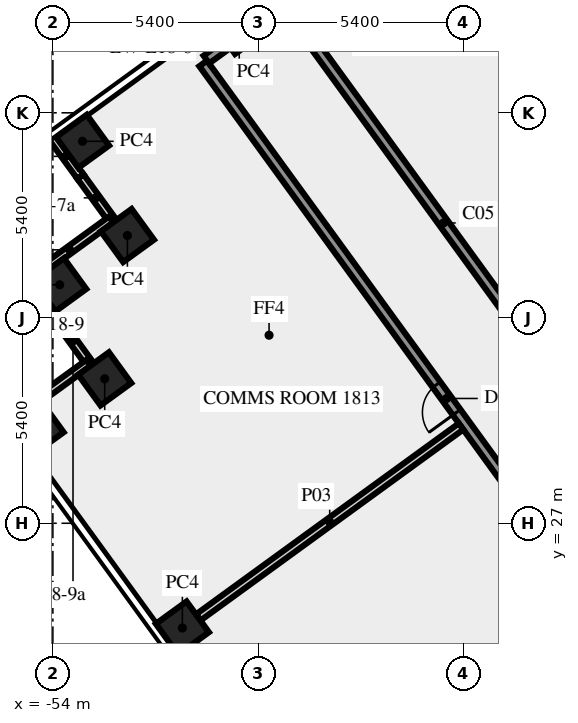
"""IFC4 building model, lengths in metres.
Left out: names, types, materials, properties, quantities, classifications, styles, units other than length and angle.
Written with IfcOpenShell. Run it as: python <this file> out.ifc"""

import sys

from ifc_helpers import new_model, si_unit, direction, frame, frame_2d, origin, origin_2d, place, context, subcontext, project, spatial, rectangle, extrude, element, fill, save


model = new_model("IFC4")
c1 = context("Model", 3, precision=1e-05, world=origin(), true_north=direction((0.0, 1.0)))
c2 = subcontext(c1, "Body", "Model", "MODEL_VIEW")
j1 = project(units=[si_unit("LENGTHUNIT", "METRE"), si_unit("PLANEANGLEUNIT", "RADIAN")], contexts=[c1])
p1 = place(None, origin())
s1 = spatial("IfcSite", under=j1, at=p1, CompositionType="ELEMENT")
p2 = place(p1, origin())
s2 = spatial("IfcBuilding", under=s1, at=p2, CompositionType="ELEMENT")
p3 = place(p2, frame((0.0, 0.0, 79.0)))
s3 = spatial("IfcBuildingStorey", under=s2, at=p3, CompositionType="ELEMENT", Elevation=79.0)
for number, where, z_axis, x_axis in (
    (1, (-49.096, 40.047, 0.0), (0.0, 0.0, 1.0), (-0.809, -0.588, 0.0)),
    (2, (-53.22, 37.05, 0.0), (0.0, 0.0, 1.0), (0.588, -0.809, 0.0)),
    (3, (-52.039, 34.571, 0.0), (0.0, 0.0, 1.0), (-0.809, -0.588, 0.0)),
    (4, (-53.82, 33.275, 0.0), (0.0, 0.0, 1.0), (0.588, -0.809, 0.0)),
    (5, (-52.636, 30.8, 0.0), (0.0, 0.0, 1.0), (-0.809, -0.588, 0.0)),
    (6, (-54.415, 29.505, 0.0), (0.0, 0.0, 1.0), (0.588, -0.809, 0.0)),
    (7, (-50.592, 24.243, 0.0), (0.0, 0.0, 1.0), (0.588, -0.809, 0.0)),
):
    element("IfcColumn", number, at=place(p3, frame(where, z_axis=z_axis, x_axis=x_axis)), inside=s3, PredefinedType="COLUMN", context=c2, shape_type="SweptSolid", body=[
        extrude(rectangle(XDim=1.0, YDim=1.0, at=origin_2d()), origin(), (0.0, 0.0, 1.0), 5.65),
    ])
p4 = place(p3, frame((-44.83, 43.872, 0.0), z_axis=(0.0, 0.0, 1.0), x_axis=(-0.809023074878, -0.587776883106, 0.0)))
e8 = element("IfcWall", 8, at=p4, inside=s3, PredefinedType="SOLIDWALL", context=c2, shape_type="SweptSolid", body=[
    extrude(rectangle(XDim=11.4, YDim=0.2, at=frame_2d((5.7, 0.0))), origin(), (0.0, 0.0, 1.0), 5.65),
])
p5 = place(p3, frame((-54.05, 37.188, 0.0), z_axis=(0.0, 0.0, 1.0), x_axis=(0.58786388341, -0.808959859686, 0.0)))
e9 = element("IfcWall", 9, at=p5, inside=s3, PredefinedType="SOLIDWALL", context=c2, shape_type="SweptSolid", body=[
    extrude(rectangle(XDim=1.321, YDim=0.2, at=frame_2d((0.66, 0.0))), origin(), (0.0, 0.0, 1.0), 5.65),
])
p6 = place(p3, frame((-53.273, 36.12, 0.0), z_axis=(0.0, 0.0, 1.0), x_axis=(0.587782252522, -0.809019173827, 0.0)))
e10 = element("IfcWall", 10, at=p6, inside=s3, PredefinedType="SOLIDWALL", context=c2, shape_type="SweptSolid", body=[
    extrude(rectangle(XDim=1.379, YDim=0.2, at=frame_2d((0.69, 0.0))), origin(), (0.0, 0.0, 1.0), 4.15),
])
p7 = place(p3, frame((-52.465, 34.987, 0.0), z_axis=(0.0, 0.0, 1.0), x_axis=(-0.809033161865, -0.587762999008, 0.0)))
e11 = element("IfcWall", 11, at=p7, inside=s3, PredefinedType="SOLIDWALL", context=c2, shape_type="SweptSolid", body=[
    extrude(rectangle(XDim=2.7, YDim=0.2, at=frame_2d((1.35, 0.0))), origin(), (0.0, 0.0, 1.0), 5.65),
])
p8 = place(p3, frame((-54.647, 33.417, 0.0), z_axis=(0.0, 0.0, 1.0), x_axis=(0.587871379726, -0.808954412127, 0.0)))
e12 = element("IfcWall", 12, at=p8, inside=s3, PredefinedType="SOLIDWALL", context=c2, shape_type="SweptSolid", body=[
    extrude(rectangle(XDim=1.305, YDim=0.2, at=frame_2d((0.653, 0.0))), origin(), (0.0, 0.0, 1.0), 5.65),
])
p9 = place(p3, frame((-53.88, 32.361, 0.0), z_axis=(0.0, 0.0, 1.0), x_axis=(0.587776137069, -0.809023616894, 0.0)))
e13 = element("IfcWall", 13, at=p9, inside=s3, PredefinedType="SOLIDWALL", context=c2, shape_type="SweptSolid", body=[
    extrude(rectangle(XDim=1.395, YDim=0.2, at=frame_2d((0.697, 0.0))), origin(), (0.0, 0.0, 1.0), 4.15),
])
p10 = place(p3, frame((-53.063, 31.216, 0.0), z_axis=(0.0, 0.0, 1.0), x_axis=(-0.809033161865, -0.587762999008, 0.0)))
e14 = element("IfcWall", 14, at=p10, inside=s3, PredefinedType="SOLIDWALL", context=c2, shape_type="SweptSolid", body=[
    extrude(rectangle(XDim=2.7, YDim=0.2, at=frame_2d((1.35, 0.0))), origin(), (0.0, 0.0, 1.0), 5.65),
])
p11 = place(p3, frame((-55.244, 29.646, 0.0), z_axis=(0.0, 0.0, 1.0), x_axis=(0.587784449244, -0.809017577823, 0.0)))
e15 = element("IfcWall", 15, at=p11, inside=s3, PredefinedType="SOLIDWALL", context=c2, shape_type="SweptSolid", body=[
    extrude(rectangle(XDim=44.654, YDim=0.2, at=frame_2d((22.327, 0.0))), origin(), (0.0, 0.0, 1.0), 5.65),
])
p12 = place(p3, frame((-20.531, -1.523, 0.0), z_axis=(0.0, 0.0, 1.0), x_axis=(-0.587785385475, 0.809016897612, 0.0)))
e16 = element("IfcWall", 16, at=p12, inside=s3, PredefinedType="SOLIDWALL", context=c2, shape_type="SweptSolid", body=[
    extrude(rectangle(XDim=50.212, YDim=0.25, at=frame_2d((25.106, 0.0))), origin(), (0.0, 0.0, 1.0), 5.65),
])
p13 = place(p12, frame((22.665, 0.0, 0.0)))
e17 = element("IfcOpeningElement", 17, at=p13, cuts=e16, PredefinedType="OPENING", context=c2, shape_type="SweptSolid", body=[
    extrude(rectangle(XDim=1.2, YDim=2.1, at=frame_2d((0.6, 1.05))), frame((0.0, 0.135, 0.0), z_axis=(0.0, -1.0, 0.0), x_axis=(1.0, 0.0, 0.0)), (0.0, 0.0, 1.0), 0.27),
])
p14 = place(p12, frame((38.865, 0.0, 0.0)))
e18 = element("IfcOpeningElement", 18, at=p14, cuts=e16, PredefinedType="OPENING", context=c2, shape_type="SweptSolid", body=[
    extrude(rectangle(XDim=0.9, YDim=2.1, at=frame_2d((0.45, 1.05))), frame((0.0, 0.135, 0.0), z_axis=(0.0, -1.0, 0.0), x_axis=(1.0, 0.0, 0.0)), (0.0, 0.0, 1.0), 0.27),
])
p15 = place(p12, frame((0.533, 0.0, 0.0)))
e19 = element("IfcOpeningElement", 19, at=p15, cuts=e16, PredefinedType="OPENING", context=c2, shape_type="SweptSolid", body=[
    extrude(rectangle(XDim=1.2, YDim=2.1, at=frame_2d((0.6, 1.05))), frame((0.0, 0.135, 0.0), z_axis=(0.0, -1.0, 0.0), x_axis=(1.0, 0.0, 0.0)), (0.0, 0.0, 1.0), 0.27),
])
p16 = place(p12, frame((15.366, 0.0, 0.0)))
e20 = element("IfcOpeningElement", 20, at=p16, cuts=e16, PredefinedType="OPENING", context=c2, shape_type="SweptSolid", body=[
    extrude(rectangle(XDim=1.2, YDim=2.1, at=frame_2d((0.6, 1.05))), frame((0.0, 0.135, 0.0), z_axis=(0.0, -1.0, 0.0), x_axis=(1.0, 0.0, 0.0)), (0.0, 0.0, 1.0), 0.27),
])
p17 = place(p12, frame((21.066, 0.0, 0.0)))
e21 = element("IfcOpeningElement", 21, at=p17, cuts=e16, PredefinedType="OPENING", context=c2, shape_type="SweptSolid", body=[
    extrude(rectangle(XDim=0.9, YDim=2.1, at=frame_2d((0.45, 1.05))), frame((0.0, 0.135, 0.0), z_axis=(0.0, -1.0, 0.0), x_axis=(1.0, 0.0, 0.0)), (0.0, 0.0, 1.0), 0.27),
])
p18 = place(p3, frame((-49.96, 39.202, 0.0), z_axis=(0.0, 0.0, 1.0), x_axis=(0.809045768422, 0.587745646176, 0.0)))
e22 = element("IfcWall", 22, at=p18, inside=s3, PredefinedType="SOLIDWALL", context=c2, shape_type="SweptSolid", body=[
    extrude(rectangle(XDim=2.488, YDim=0.25, at=frame_2d((1.244, 0.0))), origin(), (0.0, 0.0, 1.0), 5.65),
])
p19 = place(p3, frame((-47.845, 40.58, 0.0), z_axis=(0.0, 0.0, 1.0), x_axis=(0.587788979369, -0.809014286482, 0.0)))
e23 = element("IfcWall", 23, at=p19, inside=s3, PredefinedType="SOLIDWALL", context=c2, shape_type="SweptSolid", body=[
    extrude(rectangle(XDim=14.036, YDim=0.25, at=frame_2d((7.018, 0.0))), origin(), (0.0, 0.0, 1.0), 5.65),
])
p20 = place(p19, frame((12.496, 0.0, 0.0)))
e24 = element("IfcOpeningElement", 24, at=p20, cuts=e23, PredefinedType="OPENING", context=c2, shape_type="SweptSolid", body=[
    extrude(rectangle(XDim=1.2, YDim=2.1, at=frame_2d((0.6, 1.05))), frame((0.0, 0.135, 0.0), z_axis=(0.0, -1.0, 0.0), x_axis=(1.0, 0.0, 0.0)), (0.0, 0.0, 1.0), 0.27),
])
p21 = place(p3, frame((-43.259, 29.547, 0.0), z_axis=(0.0, 0.0, 1.0), x_axis=(-0.809017696548, -0.587784285834, 0.0)))
e25 = element("IfcWall", 25, at=p21, inside=s3, PredefinedType="SOLIDWALL", context=c2, shape_type="SweptSolid", body=[
    extrude(rectangle(XDim=8.545, YDim=0.2, at=frame_2d((4.272, 0.0))), origin(), (0.0, 0.0, 1.0), 5.65),
])
p22 = place(p14, origin())
e26 = element("IfcDoor", 26, at=p22, inside=s3, OperationType="SINGLE_SWING_LEFT", PredefinedType="DOOR", context=c2, shape_type="SweptSolid", body=[
    extrude(rectangle(XDim=0.9, YDim=2.1, at=frame_2d((0.45, 1.05))), frame((0.0, 0.025, 0.0), z_axis=(0.0, -1.0, 0.0), x_axis=(1.0, 0.0, 0.0)), (0.0, 0.0, 1.0), 0.05),
])
fill(e18, e26)
save(model, sys.argv[1])
